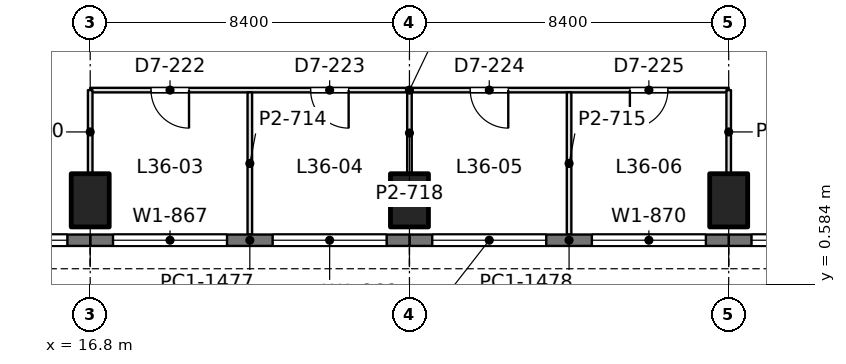
"""IFC4 building model, lengths in metres.
Left out: names, types, materials, properties, quantities, classifications, styles, units other than length and angle.
Written with IfcOpenShell. Run it as: python <this file> out.ifc"""

import sys

from ifc_helpers import new_model, si_unit, direction, frame, frame_2d, origin, origin_2d, place, context, subcontext, project, spatial, rectangle, extrude, element, fill, save


model = new_model("IFC4")
c1 = context("Model", 3, precision=1e-05, world=origin(), true_north=direction((0.0, 1.0)))
c2 = subcontext(c1, "Body", "Model", "MODEL_VIEW")
j1 = project(units=[si_unit("LENGTHUNIT", "METRE"), si_unit("PLANEANGLEUNIT", "RADIAN")], contexts=[c1])
p1 = place(None, origin())
s1 = spatial("IfcSite", under=j1, at=p1, CompositionType="ELEMENT")
p2 = place(p1, origin())
s2 = spatial("IfcBuilding", under=s1, at=p2, CompositionType="ELEMENT")
p3 = place(p2, frame((0.0, 0.0, 159.6)))
s3 = spatial("IfcBuildingStorey", under=s2, at=p3, CompositionType="ELEMENT", Elevation=159.6)
for number, where, z_axis, x_axis in (
    (1, (16.8, 2.8, 0.0), (0.0, 0.0, 1.0), (1.0, 0.0, 0.0)),
    (2, (25.2, 2.8, 0.0), (0.0, 0.0, 1.0), (1.0, 0.0, 0.0)),
    (3, (33.6, 2.8, 0.0), (0.0, 0.0, 1.0), (1.0, 0.0, 0.0)),
):
    element("IfcColumn", number, at=place(p3, frame(where, z_axis=z_axis, x_axis=x_axis)), inside=s3, PredefinedType="COLUMN", context=c2, shape_type="SweptSolid", body=[
        extrude(rectangle(XDim=1.0, YDim=1.4, at=origin_2d()), origin(), (0.0, 0.0, 1.0), 4.2),
    ])
p4 = place(p3, frame((42.0, 1.75, 0.0), z_axis=(0.0, 0.0, 1.0), x_axis=(-1.0, 0.0, 0.0)))
e4 = element("IfcWall", 4, at=p4, inside=s3, PredefinedType="SOLIDWALL", context=c2, shape_type="SweptSolid", body=[
    extrude(rectangle(XDim=8.4, YDim=0.3, at=frame_2d((4.2, 0.0))), origin(), (0.0, 0.0, 1.0), 4.05),
])
p5 = place(p4, frame((0.6, 0.0, 0.9)))
e5 = element("IfcOpeningElement", 5, at=p5, cuts=e4, PredefinedType="OPENING", context=c2, shape_type="SweptSolid", body=[
    extrude(rectangle(XDim=3.0, YDim=1.9, at=frame_2d((1.5, 0.95))), frame((0.0, 0.16, 0.0), z_axis=(0.0, -1.0, 0.0), x_axis=(1.0, 0.0, 0.0)), (0.0, 0.0, 1.0), 0.32),
])
p6 = place(p4, frame((4.8, 0.0, 0.9)))
e6 = element("IfcOpeningElement", 6, at=p6, cuts=e4, PredefinedType="OPENING", context=c2, shape_type="SweptSolid", body=[
    extrude(rectangle(XDim=3.0, YDim=1.9, at=frame_2d((1.5, 0.95))), frame((0.0, 0.16, 0.0), z_axis=(0.0, -1.0, 0.0), x_axis=(1.0, 0.0, 0.0)), (0.0, 0.0, 1.0), 0.32),
])
p7 = place(p3, frame((33.6, 1.75, 0.0), z_axis=(0.0, 0.0, 1.0), x_axis=(-1.0, 0.0, 0.0)))
e7 = element("IfcWall", 7, at=p7, inside=s3, PredefinedType="SOLIDWALL", context=c2, shape_type="SweptSolid", body=[
    extrude(rectangle(XDim=8.4, YDim=0.3, at=frame_2d((4.2, 0.0))), origin(), (0.0, 0.0, 1.0), 4.05),
])
p8 = place(p7, frame((0.6, 0.0, 0.9)))
e8 = element("IfcOpeningElement", 8, at=p8, cuts=e7, PredefinedType="OPENING", context=c2, shape_type="SweptSolid", body=[
    extrude(rectangle(XDim=3.0, YDim=1.9, at=frame_2d((1.5, 0.95))), frame((0.0, 0.16, 0.0), z_axis=(0.0, -1.0, 0.0), x_axis=(1.0, 0.0, 0.0)), (0.0, 0.0, 1.0), 0.32),
])
p9 = place(p7, frame((4.8, 0.0, 0.9)))
e9 = element("IfcOpeningElement", 9, at=p9, cuts=e7, PredefinedType="OPENING", context=c2, shape_type="SweptSolid", body=[
    extrude(rectangle(XDim=3.0, YDim=1.9, at=frame_2d((1.5, 0.95))), frame((0.0, 0.16, 0.0), z_axis=(0.0, -1.0, 0.0), x_axis=(1.0, 0.0, 0.0)), (0.0, 0.0, 1.0), 0.32),
])
p10 = place(p3, frame((25.2, 1.75, 0.0), z_axis=(0.0, 0.0, 1.0), x_axis=(-1.0, 0.0, 0.0)))
e10 = element("IfcWall", 10, at=p10, inside=s3, PredefinedType="SOLIDWALL", context=c2, shape_type="SweptSolid", body=[
    extrude(rectangle(XDim=8.4, YDim=0.3, at=frame_2d((4.2, 0.0))), origin(), (0.0, 0.0, 1.0), 4.05),
])
p11 = place(p10, frame((0.6, 0.0, 0.9)))
e11 = element("IfcOpeningElement", 11, at=p11, cuts=e10, PredefinedType="OPENING", context=c2, shape_type="SweptSolid", body=[
    extrude(rectangle(XDim=3.0, YDim=1.9, at=frame_2d((1.5, 0.95))), frame((0.0, 0.16, 0.0), z_axis=(0.0, -1.0, 0.0), x_axis=(1.0, 0.0, 0.0)), (0.0, 0.0, 1.0), 0.32),
])
p12 = place(p10, frame((4.8, 0.0, 0.9)))
e12 = element("IfcOpeningElement", 12, at=p12, cuts=e10, PredefinedType="OPENING", context=c2, shape_type="SweptSolid", body=[
    extrude(rectangle(XDim=3.0, YDim=1.9, at=frame_2d((1.5, 0.95))), frame((0.0, 0.16, 0.0), z_axis=(0.0, -1.0, 0.0), x_axis=(1.0, 0.0, 0.0)), (0.0, 0.0, 1.0), 0.32),
])
p13 = place(p3, frame((16.8, 1.75, 0.0), z_axis=(0.0, 0.0, 1.0), x_axis=(-1.0, 0.0, 0.0)))
e13 = element("IfcWall", 13, at=p13, inside=s3, PredefinedType="SOLIDWALL", context=c2, shape_type="SweptSolid", body=[
    extrude(rectangle(XDim=8.4, YDim=0.3, at=frame_2d((4.2, 0.0))), origin(), (0.0, 0.0, 1.0), 4.05),
])
p14 = place(p13, frame((0.6, 0.0, 0.9)))
e14 = element("IfcOpeningElement", 14, at=p14, cuts=e13, PredefinedType="OPENING", context=c2, shape_type="SweptSolid", body=[
    extrude(rectangle(XDim=3.0, YDim=1.9, at=frame_2d((1.5, 0.95))), frame((0.0, 0.16, 0.0), z_axis=(0.0, -1.0, 0.0), x_axis=(1.0, 0.0, 0.0)), (0.0, 0.0, 1.0), 0.32),
])
p15 = place(p13, frame((4.8, 0.0, 0.9)))
e15 = element("IfcOpeningElement", 15, at=p15, cuts=e13, PredefinedType="OPENING", context=c2, shape_type="SweptSolid", body=[
    extrude(rectangle(XDim=3.0, YDim=1.9, at=frame_2d((1.5, 0.95))), frame((0.0, 0.16, 0.0), z_axis=(0.0, -1.0, 0.0), x_axis=(1.0, 0.0, 0.0)), (0.0, 0.0, 1.0), 0.32),
])
p16 = place(p3, frame((16.8, 5.7, 0.0), z_axis=(0.0, 0.0, 1.0), x_axis=(1.0, 0.0, 0.0)))
e16 = element("IfcWall", 16, at=p16, inside=s3, PredefinedType="PARTITIONING", context=c2, shape_type="SweptSolid", body=[
    extrude(rectangle(XDim=16.8, YDim=0.12, at=frame_2d((8.4, 0.0))), origin(), (0.0, 0.0, 1.0), 3.55),
])
p17 = place(p16, frame((1.6, 0.0, 0.0)))
e17 = element("IfcOpeningElement", 17, at=p17, cuts=e16, PredefinedType="OPENING", context=c2, shape_type="SweptSolid", body=[
    extrude(rectangle(XDim=1.0, YDim=2.4, at=frame_2d((0.5, 1.2))), frame((0.0, 0.07, 0.0), z_axis=(0.0, -1.0, 0.0), x_axis=(1.0, 0.0, 0.0)), (0.0, 0.0, 1.0), 0.14),
])
p18 = place(p16, frame((5.8, 0.0, 0.0)))
e18 = element("IfcOpeningElement", 18, at=p18, cuts=e16, PredefinedType="OPENING", context=c2, shape_type="SweptSolid", body=[
    extrude(rectangle(XDim=1.0, YDim=2.4, at=frame_2d((0.5, 1.2))), frame((0.0, 0.07, 0.0), z_axis=(0.0, -1.0, 0.0), x_axis=(1.0, 0.0, 0.0)), (0.0, 0.0, 1.0), 0.14),
])
p19 = place(p16, frame((10.0, 0.0, 0.0)))
e19 = element("IfcOpeningElement", 19, at=p19, cuts=e16, PredefinedType="OPENING", context=c2, shape_type="SweptSolid", body=[
    extrude(rectangle(XDim=1.0, YDim=2.4, at=frame_2d((0.5, 1.2))), frame((0.0, 0.07, 0.0), z_axis=(0.0, -1.0, 0.0), x_axis=(1.0, 0.0, 0.0)), (0.0, 0.0, 1.0), 0.14),
])
p20 = place(p16, frame((14.2, 0.0, 0.0)))
e20 = element("IfcOpeningElement", 20, at=p20, cuts=e16, PredefinedType="OPENING", context=c2, shape_type="SweptSolid", body=[
    extrude(rectangle(XDim=1.0, YDim=2.4, at=frame_2d((0.5, 1.2))), frame((0.0, 0.07, 0.0), z_axis=(0.0, -1.0, 0.0), x_axis=(1.0, 0.0, 0.0)), (0.0, 0.0, 1.0), 0.14),
])
p21 = place(p3, frame((16.8, 3.499, 0.0), z_axis=(0.0, 0.0, 1.0), x_axis=(0.0, 1.0, 0.0)))
e21 = element("IfcWall", 21, at=p21, inside=s3, PredefinedType="PARTITIONING", context=c2, shape_type="SweptSolid", body=[
    extrude(rectangle(XDim=2.201, YDim=0.12, at=frame_2d((1.101, 0.0))), origin(), (0.0, 0.0, 1.0), 3.55),
])
p22 = place(p3, frame((21.0, 1.898, 0.0), z_axis=(0.0, 0.0, 1.0), x_axis=(0.0, 1.0, 0.0)))
e22 = element("IfcWall", 22, at=p22, inside=s3, PredefinedType="PARTITIONING", context=c2, shape_type="SweptSolid", body=[
    extrude(rectangle(XDim=3.744, YDim=0.12, at=frame_2d((1.872, 0.0))), origin(), (0.0, 0.0, 1.0), 3.56),
])
p23 = place(p3, frame((25.2, 3.499, 0.0), z_axis=(0.0, 0.0, 1.0), x_axis=(0.0, 1.0, 0.0)))
e23 = element("IfcWall", 23, at=p23, inside=s3, PredefinedType="PARTITIONING", context=c2, shape_type="SweptSolid", body=[
    extrude(rectangle(XDim=2.143, YDim=0.12, at=frame_2d((1.072, 0.0))), origin(), (0.0, 0.0, 1.0), 3.55),
])
p24 = place(p3, frame((29.4, 1.898, 0.0), z_axis=(0.0, 0.0, 1.0), x_axis=(0.0, 1.0, 0.0)))
e24 = element("IfcWall", 24, at=p24, inside=s3, PredefinedType="PARTITIONING", context=c2, shape_type="SweptSolid", body=[
    extrude(rectangle(XDim=3.744, YDim=0.12, at=frame_2d((1.872, 0.0))), origin(), (0.0, 0.0, 1.0), 3.56),
])
p25 = place(p3, frame((33.6, 3.499, 0.0), z_axis=(0.0, 0.0, 1.0), x_axis=(0.0, 1.0, 0.0)))
e25 = element("IfcWall", 25, at=p25, inside=s3, PredefinedType="PARTITIONING", context=c2, shape_type="SweptSolid", body=[
    extrude(rectangle(XDim=2.201, YDim=0.12, at=frame_2d((1.101, 0.0))), origin(), (0.0, 0.0, 1.0), 3.55),
])
p26 = place(p6, origin())
e26 = element("IfcWindow", 26, at=p26, inside=s3, PartitioningType="SINGLE_PANEL", PredefinedType="WINDOW", context=c2, shape_type="SweptSolid", body=[
    extrude(rectangle(XDim=3.0, YDim=1.9, at=frame_2d((1.5, 0.95))), frame((0.0, 0.03, 0.0), z_axis=(0.0, -1.0, 0.0), x_axis=(1.0, 0.0, 0.0)), (0.0, 0.0, 1.0), 0.06),
])
fill(e6, e26)
p27 = place(p8, origin())
e27 = element("IfcWindow", 27, at=p27, inside=s3, PartitioningType="SINGLE_PANEL", PredefinedType="WINDOW", context=c2, shape_type="SweptSolid", body=[
    extrude(rectangle(XDim=3.0, YDim=1.9, at=frame_2d((1.5, 0.95))), frame((0.0, 0.03, 0.0), z_axis=(0.0, -1.0, 0.0), x_axis=(1.0, 0.0, 0.0)), (0.0, 0.0, 1.0), 0.06),
])
fill(e8, e27)
p28 = place(p9, origin())
e28 = element("IfcWindow", 28, at=p28, inside=s3, PartitioningType="SINGLE_PANEL", PredefinedType="WINDOW", context=c2, shape_type="SweptSolid", body=[
    extrude(rectangle(XDim=3.0, YDim=1.9, at=frame_2d((1.5, 0.95))), frame((0.0, 0.03, 0.0), z_axis=(0.0, -1.0, 0.0), x_axis=(1.0, 0.0, 0.0)), (0.0, 0.0, 1.0), 0.06),
])
fill(e9, e28)
p29 = place(p11, origin())
e29 = element("IfcWindow", 29, at=p29, inside=s3, PartitioningType="SINGLE_PANEL", PredefinedType="WINDOW", context=c2, shape_type="SweptSolid", body=[
    extrude(rectangle(XDim=3.0, YDim=1.9, at=frame_2d((1.5, 0.95))), frame((0.0, 0.03, 0.0), z_axis=(0.0, -1.0, 0.0), x_axis=(1.0, 0.0, 0.0)), (0.0, 0.0, 1.0), 0.06),
])
fill(e11, e29)
p30 = place(p12, origin())
e30 = element("IfcWindow", 30, at=p30, inside=s3, PartitioningType="SINGLE_PANEL", PredefinedType="WINDOW", context=c2, shape_type="SweptSolid", body=[
    extrude(rectangle(XDim=3.0, YDim=1.9, at=frame_2d((1.5, 0.95))), frame((0.0, 0.03, 0.0), z_axis=(0.0, -1.0, 0.0), x_axis=(1.0, 0.0, 0.0)), (0.0, 0.0, 1.0), 0.06),
])
fill(e12, e30)
p31 = place(p14, origin())
e31 = element("IfcWindow", 31, at=p31, inside=s3, PartitioningType="SINGLE_PANEL", PredefinedType="WINDOW", context=c2, shape_type="SweptSolid", body=[
    extrude(rectangle(XDim=3.0, YDim=1.9, at=frame_2d((1.5, 0.95))), frame((0.0, 0.03, 0.0), z_axis=(0.0, -1.0, 0.0), x_axis=(1.0, 0.0, 0.0)), (0.0, 0.0, 1.0), 0.06),
])
fill(e14, e31)
p32 = place(p17, frame((1.0, 0.0, 0.0), z_axis=(0.0, 0.0, 1.0), x_axis=(-1.0, 0.0, 0.0)))
e32 = element("IfcDoor", 32, at=p32, inside=s3, OperationType="SINGLE_SWING_LEFT", PredefinedType="DOOR", context=c2, shape_type="SweptSolid", body=[
    extrude(rectangle(XDim=1.0, YDim=2.4, at=frame_2d((0.5, 1.2))), frame((0.0, 0.025, 0.0), z_axis=(0.0, -1.0, 0.0), x_axis=(1.0, 0.0, 0.0)), (0.0, 0.0, 1.0), 0.05),
])
fill(e17, e32)
p33 = place(p18, frame((1.0, 0.0, 0.0), z_axis=(0.0, 0.0, 1.0), x_axis=(-1.0, 0.0, 0.0)))
e33 = element("IfcDoor", 33, at=p33, inside=s3, OperationType="SINGLE_SWING_LEFT", PredefinedType="DOOR", context=c2, shape_type="SweptSolid", body=[
    extrude(rectangle(XDim=1.0, YDim=2.4, at=frame_2d((0.5, 1.2))), frame((0.0, 0.025, 0.0), z_axis=(0.0, -1.0, 0.0), x_axis=(1.0, 0.0, 0.0)), (0.0, 0.0, 1.0), 0.05),
])
fill(e18, e33)
p34 = place(p19, frame((1.0, 0.0, 0.0), z_axis=(0.0, 0.0, 1.0), x_axis=(-1.0, 0.0, 0.0)))
e34 = element("IfcDoor", 34, at=p34, inside=s3, OperationType="SINGLE_SWING_LEFT", PredefinedType="DOOR", context=c2, shape_type="SweptSolid", body=[
    extrude(rectangle(XDim=1.0, YDim=2.4, at=frame_2d((0.5, 1.2))), frame((0.0, 0.025, 0.0), z_axis=(0.0, -1.0, 0.0), x_axis=(1.0, 0.0, 0.0)), (0.0, 0.0, 1.0), 0.05),
])
fill(e19, e34)
p35 = place(p20, frame((1.0, 0.0, 0.0), z_axis=(0.0, 0.0, 1.0), x_axis=(-1.0, 0.0, 0.0)))
e35 = element("IfcDoor", 35, at=p35, inside=s3, OperationType="SINGLE_SWING_RIGHT", PredefinedType="DOOR", context=c2, shape_type="SweptSolid", body=[
    extrude(rectangle(XDim=1.0, YDim=2.4, at=frame_2d((0.5, 1.2))), frame((0.0, 0.025, 0.0), z_axis=(0.0, -1.0, 0.0), x_axis=(1.0, 0.0, 0.0)), (0.0, 0.0, 1.0), 0.05),
])
fill(e20, e35)
save(model, sys.argv[1])
